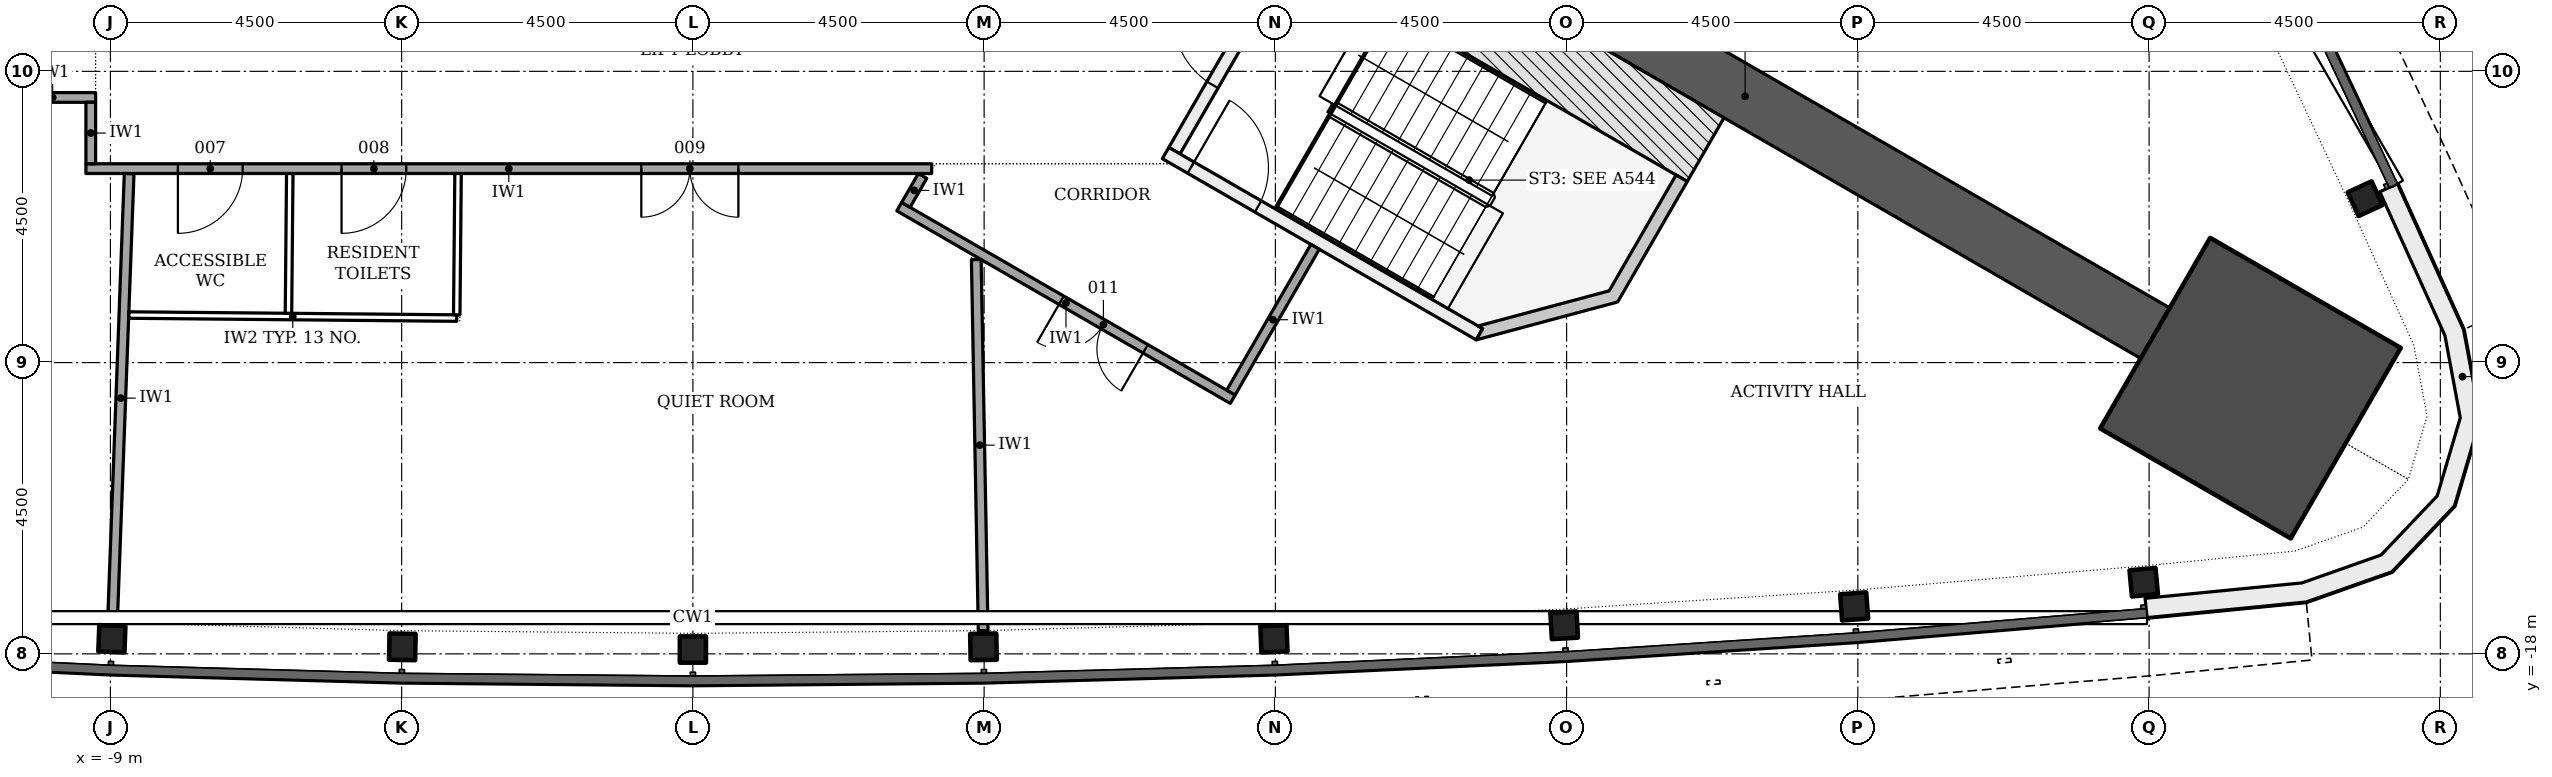
"""IFC4 building model, lengths in metres.
Left out: names, types, materials, properties, quantities, classifications, styles, units other than length and angle.
Written with IfcOpenShell. Run it as: python <this file> out.ifc"""

import sys

from ifc_helpers import new_model, si_unit, direction, frame, frame_2d, origin, origin_2d, place, context, subcontext, project, spatial, polyline, rectangle, i_section, outline, extrude, element, fill, save


model = new_model("IFC4")
c1 = context("Model", 3, precision=1e-05, world=origin(), true_north=direction((0.0, 1.0)))
c2 = subcontext(c1, "Body", "Model", "MODEL_VIEW")
j1 = project(units=[si_unit("LENGTHUNIT", "METRE"), si_unit("PLANEANGLEUNIT", "RADIAN")], contexts=[c1])
p1 = place(None, origin())
s1 = spatial("IfcSite", under=j1, at=p1, CompositionType="ELEMENT")
p2 = place(p1, origin())
s2 = spatial("IfcBuilding", under=s1, at=p2, CompositionType="ELEMENT")
p3 = place(p2, frame((0.0, 0.0, 27.6)))
s3 = spatial("IfcBuildingStorey", under=s2, at=p3, CompositionType="ELEMENT", Elevation=27.6)
for number, where, z_axis, x_axis in (
    (1, (-9.922, -5.728, -0.2), (0.0, 0.0, 1.0), (-0.866, -0.5, 0.0)),
    (2, (9.922, -5.728, -0.2), (0.0, 0.0, 1.0), (0.866, -0.5, 0.0)),
):
    element("IfcWall", number, at=place(p3, frame(where, z_axis=z_axis, x_axis=x_axis)), inside=s3, PredefinedType="SHEAR", context=c2, shape_type="SweptSolid", body=[
        extrude(rectangle(XDim=14.633, YDim=0.9, at=frame_2d((7.316, 0.0))), origin(), (0.0, 0.0, 1.0), 3.6),
    ])
p4 = place(p3, frame((24.066, -13.895, -0.2), z_axis=(0.0, 0.0, 1.0), x_axis=(0.866025403784, -0.5, 0.0)))
e3 = element("IfcColumn", 3, at=p4, inside=s3, PredefinedType="COLUMN", context=c2, shape_type="SweptSolid", body=[
    extrude(rectangle(XDim=3.4, YDim=3.4, at=origin_2d()), origin(), (0.0, 0.0, 1.0), 3.6),
])
for number, where, z_axis, x_axis in (
    (4, (-8.978, -17.767, -0.2), (0.0, 0.0, 1.0), (0.999, -0.037, 0.0)),
    (5, (-4.49, -17.892, -0.2), (0.0, 0.0, 1.0), (1.0, -0.019, 0.0)),
    (6, (0.0, -17.933, -0.2), (0.0, 0.0, 1.0), (1.0, 0.0, 0.0)),
    (7, (4.49, -17.892, -0.2), (0.0, 0.0, 1.0), (1.0, 0.019, 0.0)),
    (8, (8.978, -17.767, -0.2), (0.0, 0.0, 1.0), (0.999, 0.037, 0.0)),
    (9, (13.462, -17.558, -0.2), (0.0, 0.0, 1.0), (0.998, 0.056, 0.0)),
    (10, (17.943, -17.267, -0.2), (0.0, 0.0, 1.0), (0.997, 0.074, 0.0)),
    (11, (22.417, -16.893, -0.2), (0.0, 0.0, 1.0), (0.996, 0.093, 0.0)),
    (12, (25.838, -10.967, -0.2), (0.0, 0.0, 1.0), (-0.418, 0.909, 0.0)),
):
    element("IfcColumn", number, at=place(p3, frame(where, z_axis=z_axis, x_axis=x_axis)), inside=s3, PredefinedType="COLUMN", context=c2, shape_type="SweptSolid", body=[
        extrude(i_section(OverallWidth=0.404, OverallDepth=0.406, WebThickness=0.027, FlangeThickness=0.044, FilletRadius=0.015, at=origin_2d()), origin(), (0.0, 0.0, 1.0), 3.6),
    ])
p5 = place(p3, origin())
e13 = element("IfcWall", 13, at=p5, inside=s3, PredefinedType="NOTDEFINED", context=c2, shape_type="SweptSolid", body=[
    extrude(outline(polyline([(22.468, -17.44), (24.929, -17.199), (26.252, -16.732), (27.218, -15.715), (27.616, -14.369), (27.359, -12.99), (26.338, -10.738), (26.064, -10.861), (27.071, -13.08), (27.308, -14.353), (26.951, -15.56), (26.084, -16.473), (24.863, -16.904), (22.438, -17.142), (22.468, -17.44)])), origin(), (0.0, 0.0, 1.0), 3.3),
])
p6 = place(p3, frame((7.44, -10.226, -0.2), z_axis=(0.0, 0.0, 1.0), x_axis=(0.500022077904, 0.866012656725, 0.0)))
e14 = element("IfcWall", 14, at=p6, inside=s3, PredefinedType="SHEAR", context=c2, shape_type="SweptSolid", body=[
    extrude(rectangle(XDim=3.55, YDim=0.2, at=frame_2d((1.775, 0.0))), origin(), (0.0, 0.0, 1.0), 3.6),
])
p7 = place(p6, frame((1.175, 0.0, 0.2)))
e15 = element("IfcOpeningElement", 15, at=p7, cuts=e14, PredefinedType="OPENING", context=c2, shape_type="SweptSolid", body=[
    extrude(rectangle(XDim=1.2, YDim=2.1, at=frame_2d((0.6, 1.05))), frame((0.0, 0.11, 0.0), z_axis=(0.0, -1.0, 0.0), x_axis=(1.0, 0.0, 0.0)), (0.0, 0.0, 1.0), 0.22),
])
p8 = place(p3, frame((7.304, -10.262, -0.2), z_axis=(0.0, 0.0, 1.0), x_axis=(0.866026594901, -0.49999793692, 0.0)))
e16 = element("IfcWall", 16, at=p8, inside=s3, PredefinedType="SHEAR", context=c2, shape_type="SweptSolid", body=[
    extrude(rectangle(XDim=5.6, YDim=0.2, at=frame_2d((2.8, 0.0))), origin(), (0.0, 0.0, 1.0), 3.6),
])
p9 = place(p8, frame((0.45, 0.0, 0.2)))
e17 = element("IfcOpeningElement", 17, at=p9, cuts=e16, PredefinedType="OPENING", context=c2, shape_type="SweptSolid", body=[
    extrude(rectangle(XDim=1.2, YDim=2.1, at=frame_2d((0.6, 1.05))), frame((0.0, 0.11, 0.0), z_axis=(0.0, -1.0, 0.0), x_axis=(1.0, 0.0, 0.0)), (0.0, 0.0, 1.0), 0.22),
])
p10 = place(p3, frame((9.413, -6.61, -0.2), z_axis=(0.0, 0.0, 1.0), x_axis=(0.866018442252, -0.500012057535, 0.0)))
e18 = element("IfcWall", 18, at=p10, inside=s3, PredefinedType="SHEAR", context=c2, shape_type="SweptSolid", body=[
    extrude(rectangle(XDim=7.2, YDim=1.136, at=frame_2d((3.6, 0.0))), origin(), (0.0, 0.0, 1.0), 3.6),
])
p11 = place(p3, frame((0.0, 0.0, -0.2)))
e19 = element("IfcWall", 19, at=p11, inside=s3, PredefinedType="SHEAR", context=c2, shape_type="SweptSolid", body=[
    extrude(outline(polyline([(12.104, -13.149), (14.289, -12.563), (15.364, -10.701), (15.191, -10.601), (14.157, -12.392), (12.132, -12.934), (12.204, -12.976), (12.204, -12.976), (12.204, -12.976), (12.204, -12.976), (12.204, -12.976), (12.204, -12.976), (12.204, -12.976), (12.204, -12.976), (12.204, -12.976), (12.204, -12.976), (12.204, -12.976), (12.204, -12.976), (12.204, -12.976), (12.204, -12.976), (12.204, -12.976), (12.204, -12.976), (12.204, -12.976), (12.104, -13.149)])), origin(), (0.0, 0.0, 1.0), 3.6),
])
p12 = place(p3, frame((3.689, -10.503, 0.0), z_axis=(0.0, 0.0, 1.0), x_axis=(-1.0, 0.0, 0.0)))
e20 = element("IfcWall", 20, at=p12, inside=s3, PredefinedType="PARTITIONING", context=c2, shape_type="SweptSolid", body=[
    extrude(rectangle(XDim=13.068, YDim=0.15, at=frame_2d((6.534, 0.0))), origin(), (0.0, 0.0, 1.0), 2.768),
])
p13 = place(p12, frame((10.646, 0.0, 0.0)))
e21 = element("IfcOpeningElement", 21, at=p13, cuts=e20, PredefinedType="OPENING", context=c2, shape_type="SweptSolid", body=[
    extrude(rectangle(XDim=1.0, YDim=2.1, at=frame_2d((0.5, 1.05))), frame((0.0, 0.085, 0.0), z_axis=(0.0, -1.0, 0.0), x_axis=(1.0, 0.0, 0.0)), (0.0, 0.0, 1.0), 0.17),
])
p14 = place(p12, frame((8.118, 0.0, 0.0)))
e22 = element("IfcOpeningElement", 22, at=p14, cuts=e20, PredefinedType="OPENING", context=c2, shape_type="SweptSolid", body=[
    extrude(rectangle(XDim=1.0, YDim=2.1, at=frame_2d((0.5, 1.05))), frame((0.0, 0.085, 0.0), z_axis=(0.0, -1.0, 0.0), x_axis=(1.0, 0.0, 0.0)), (0.0, 0.0, 1.0), 0.17),
])
p15 = place(p12, frame((2.986, 0.0, 0.0)))
e23 = element("IfcOpeningElement", 23, at=p15, cuts=e20, PredefinedType="OPENING", context=c2, shape_type="SweptSolid", body=[
    extrude(rectangle(XDim=1.5, YDim=2.1, at=frame_2d((0.75, 1.05))), frame((0.0, 0.085, 0.0), z_axis=(0.0, -1.0, 0.0), x_axis=(1.0, 0.0, 0.0)), (0.0, 0.0, 1.0), 0.17),
])
p16 = place(p3, frame((8.341, -14.066, 0.0), z_axis=(0.0, 0.0, 1.0), x_axis=(-0.866017493347, 0.500013701029, 0.0)))
e24 = element("IfcWall", 24, at=p16, inside=s3, PredefinedType="PARTITIONING", context=c2, shape_type="SweptSolid", body=[
    extrude(rectangle(XDim=5.95, YDim=0.15, at=frame_2d((2.975, 0.0))), origin(), (0.0, 0.0, 1.0), 2.768),
])
p17 = place(p16, frame((1.557, 0.0, 0.0)))
e25 = element("IfcOpeningElement", 25, at=p17, cuts=e24, PredefinedType="OPENING", context=c2, shape_type="SweptSolid", body=[
    extrude(rectangle(XDim=1.5, YDim=2.1, at=frame_2d((0.75, 1.05))), frame((0.0, 0.085, 0.0), z_axis=(0.0, -1.0, 0.0), x_axis=(1.0, 0.0, 0.0)), (0.0, 0.0, 1.0), 0.17),
])
p18 = place(p3, frame((8.314, -13.963, 0.0), z_axis=(0.0, 0.0, 1.0), x_axis=(0.499936506574, 0.866062058628, 0.0)))
e26 = element("IfcWall", 26, at=p18, inside=s3, PredefinedType="PARTITIONING", context=c2, shape_type="SweptSolid", body=[
    extrude(rectangle(XDim=2.6, YDim=0.15, at=frame_2d((1.3, 0.0))), origin(), (0.0, 0.0, 1.0), 2.923),
])
p19 = place(p3, frame((-10.555, -9.403, 0.0), z_axis=(0.0, 0.0, 1.0), x_axis=(1.0, 0.0, 0.0)))
e27 = element("IfcWall", 27, at=p19, inside=s3, PredefinedType="PARTITIONING", context=c2, shape_type="SweptSolid", body=[
    extrude(rectangle(XDim=1.326, YDim=0.15, at=frame_2d((0.663, 0.0))), origin(), (0.0, 0.0, 1.0), 3.4),
])
p20 = place(p3, frame((-9.304, -10.428, 0.0), z_axis=(0.0, 0.0, 1.0), x_axis=(0.0, 1.0, 0.0)))
e28 = element("IfcWall", 28, at=p20, inside=s3, PredefinedType="PARTITIONING", context=c2, shape_type="SweptSolid", body=[
    extrude(rectangle(XDim=0.95, YDim=0.15, at=frame_2d((0.475, 0.0))), origin(), (0.0, 0.0, 1.0), 3.4),
])
p21 = place(p3, frame((3.291, -11.063, 0.0), z_axis=(0.0, 0.0, 1.0), x_axis=(0.499899694197, 0.866083307622, 0.0)))
e29 = element("IfcWall", 29, at=p21, inside=s3, PredefinedType="PARTITIONING", context=c2, shape_type="SweptSolid", body=[
    extrude(rectangle(XDim=0.517, YDim=0.15, at=frame_2d((0.258, 0.0))), origin(), (0.0, 0.0, 1.0), 3.4),
])
p22 = place(p3, frame((-8.968, -17.517, 0.0), z_axis=(0.0, 0.0, 1.0), x_axis=(0.037111842783, 0.999311118284, 0.0)))
e30 = element("IfcWall", 30, at=p22, inside=s3, PredefinedType="PARTITIONING", context=c2, shape_type="SweptSolid", body=[
    extrude(rectangle(XDim=6.94, YDim=0.15, at=frame_2d((3.47, 0.0))), origin(), (0.0, 0.0, 1.0), 2.768),
])
p23 = place(p3, frame((4.485, -17.642, 0.0), z_axis=(0.0, 0.0, 1.0), x_axis=(-0.018565794352, 0.999827640786, 0.0)))
e31 = element("IfcWall", 31, at=p23, inside=s3, PredefinedType="PARTITIONING", context=c2, shape_type="SweptSolid", body=[
    extrude(rectangle(XDim=5.733, YDim=0.15, at=frame_2d((2.867, 0.0))), origin(), (0.0, 0.0, 1.0), 2.768),
])
p24 = place(p3, frame((-8.715, -12.765, 0.0), z_axis=(0.0, 0.0, 1.0), x_axis=(0.999957193633, -0.00925261596, 0.0)))
e32 = element("IfcWall", 32, at=p24, inside=s3, PredefinedType="PARTITIONING", context=c2, shape_type="SweptSolid", body=[
    extrude(rectangle(XDim=5.066, YDim=0.1, at=frame_2d((2.533, 0.0))), origin(), (0.0, 0.0, 1.0), 2.768),
])
p25 = place(p3, frame((-3.649, -12.762, 0.0), z_axis=(0.0, 0.0, 1.0), x_axis=(0.009279564663, 0.999956943913, 0.0)))
e33 = element("IfcWall", 33, at=p25, inside=s3, PredefinedType="PARTITIONING", context=c2, shape_type="SweptSolid", body=[
    extrude(rectangle(XDim=2.184, YDim=0.1, at=frame_2d((1.092, 0.0))), origin(), (0.0, 0.0, 1.0), 3.4),
])
p26 = place(p3, frame((-6.249, -12.738, 0.0), z_axis=(0.0, 0.0, 1.0), x_axis=(0.009270376076, 0.99995702914, 0.0)))
e34 = element("IfcWall", 34, at=p26, inside=s3, PredefinedType="PARTITIONING", context=c2, shape_type="SweptSolid", body=[
    extrude(rectangle(XDim=2.159, YDim=0.1, at=frame_2d((1.08, 0.0))), origin(), (0.0, 0.0, 1.0), 3.4),
])
p27 = place(p7, origin())
e35 = element("IfcDoor", 35, at=p27, inside=s3, OperationType="SINGLE_SWING_RIGHT", PredefinedType="DOOR", context=c2, shape_type="SweptSolid", body=[
    extrude(rectangle(XDim=1.2, YDim=2.1, at=frame_2d((0.6, 1.05))), frame((0.0, 0.025, 0.0), z_axis=(0.0, -1.0, 0.0), x_axis=(1.0, 0.0, 0.0)), (0.0, 0.0, 1.0), 0.05),
])
fill(e15, e35)
p28 = place(p9, origin())
e36 = element("IfcDoor", 36, at=p28, inside=s3, OperationType="SINGLE_SWING_LEFT", PredefinedType="DOOR", context=c2, shape_type="SweptSolid", body=[
    extrude(rectangle(XDim=1.2, YDim=2.1, at=frame_2d((0.6, 1.05))), frame((0.0, 0.025, 0.0), z_axis=(0.0, -1.0, 0.0), x_axis=(1.0, 0.0, 0.0)), (0.0, 0.0, 1.0), 0.05),
])
fill(e17, e36)
p29 = place(p13, origin())
e37 = element("IfcDoor", 37, at=p29, inside=s3, OperationType="SINGLE_SWING_RIGHT", PredefinedType="DOOR", context=c2, shape_type="SweptSolid", body=[
    extrude(rectangle(XDim=1.0, YDim=2.1, at=frame_2d((0.5, 1.05))), frame((0.0, 0.025, 0.0), z_axis=(0.0, -1.0, 0.0), x_axis=(1.0, 0.0, 0.0)), (0.0, 0.0, 1.0), 0.05),
])
fill(e21, e37)
p30 = place(p14, origin())
e38 = element("IfcDoor", 38, at=p30, inside=s3, OperationType="SINGLE_SWING_RIGHT", PredefinedType="DOOR", context=c2, shape_type="SweptSolid", body=[
    extrude(rectangle(XDim=1.0, YDim=2.1, at=frame_2d((0.5, 1.05))), frame((0.0, 0.025, 0.0), z_axis=(0.0, -1.0, 0.0), x_axis=(1.0, 0.0, 0.0)), (0.0, 0.0, 1.0), 0.05),
])
fill(e22, e38)
p31 = place(p15, origin())
e39 = element("IfcDoor", 39, at=p31, inside=s3, OperationType="DOUBLE_DOOR_SINGLE_SWING", PredefinedType="DOOR", context=c2, shape_type="SweptSolid", body=[
    extrude(rectangle(XDim=1.5, YDim=2.1, at=frame_2d((0.75, 1.05))), frame((0.0, 0.025, 0.0), z_axis=(0.0, -1.0, 0.0), x_axis=(1.0, 0.0, 0.0)), (0.0, 0.0, 1.0), 0.05),
])
fill(e23, e39)
p32 = place(p17, origin())
e40 = element("IfcDoor", 40, at=p32, inside=s3, OperationType="DOUBLE_DOOR_SINGLE_SWING", PredefinedType="DOOR", context=c2, shape_type="SweptSolid", body=[
    extrude(rectangle(XDim=1.5, YDim=2.1, at=frame_2d((0.75, 1.05))), frame((0.0, 0.025, 0.0), z_axis=(0.0, -1.0, 0.0), x_axis=(1.0, 0.0, 0.0)), (0.0, 0.0, 1.0), 0.05),
])
fill(e25, e40)
save(model, sys.argv[1])
